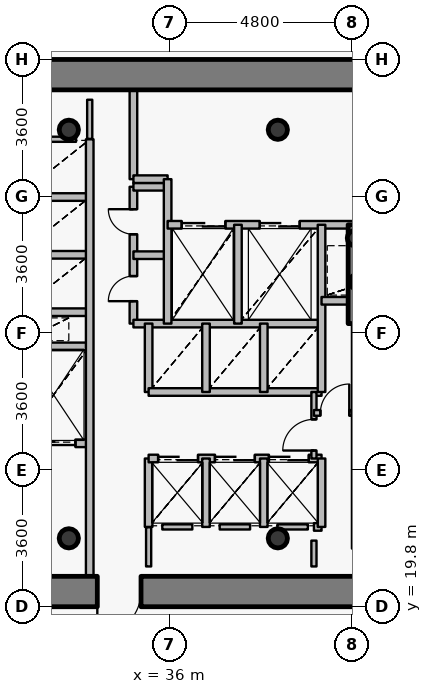
"""IFC4 building model, lengths in metres.
Left out: names, types, materials, properties, quantities, classifications, styles, units other than length and angle.
Written with IfcOpenShell. Run it as: python <this file> out.ifc"""

import sys

from ifc_helpers import new_model, si_unit, direction, frame, frame_2d, origin, origin_2d, place, context, subcontext, project, spatial, rectangle, hollow_circle, extrude, source, transform, mapped, element, fill, save


model = new_model("IFC4")
c1 = context("Model", 3, precision=1e-05, world=origin(), true_north=direction((0.0, 1.0)))
c2 = subcontext(c1, "Body", "Model", "MODEL_VIEW")
j1 = project(units=[si_unit("LENGTHUNIT", "METRE"), si_unit("PLANEANGLEUNIT", "RADIAN")], contexts=[c1])
p1 = place(None, origin())
s1 = spatial("IfcSite", under=j1, at=p1, CompositionType="ELEMENT")
p2 = place(p1, origin())
s2 = spatial("IfcBuilding", under=s1, at=p2, CompositionType="ELEMENT")
p3 = place(p2, frame((0.0, 0.0, 130.95)))
s3 = spatial("IfcBuildingStorey", under=s2, at=p3, CompositionType="ELEMENT", Elevation=130.95)
for number, where, z_axis, x_axis in (
    (1, (33.35, 21.6, 0.0), (0.0, 0.0, 1.0), (1.0, 0.0, 0.0)),
    (2, (38.85, 21.6, 0.0), (0.0, 0.0, 1.0), (1.0, 0.0, 0.0)),
    (3, (38.85, 32.35, 0.0), (0.0, 0.0, 1.0), (1.0, 0.0, 0.0)),
    (4, (33.35, 32.35, 0.0), (0.0, 0.0, 1.0), (1.0, 0.0, 0.0)),
):
    element("IfcColumn", number, at=place(p3, frame(where, z_axis=z_axis, x_axis=x_axis)), inside=s3, PredefinedType="COLUMN", context=c2, shape_type="SweptSolid", body=[
        extrude(hollow_circle(Radius=0.254, WallThickness=0.02, at=origin_2d()), origin(), (0.0, 0.0, 1.0), 3.75),
    ])
for number, where, z_axis, x_axis in (
    (5, (40.95, 28.35, 0.0), (0.0, 0.0, 1.0), (1.0, 0.0, 0.0)),
    (6, (40.88, 29.5, 0.0), (0.0, 0.0, 1.0), (1.0, 0.0, 0.0)),
):
    element("IfcColumn", number, at=place(p3, frame(where, z_axis=z_axis, x_axis=x_axis)), inside=s3, PredefinedType="COLUMN", context=c2, shape_type="SweptSolid", body=[
        extrude(hollow_circle(Radius=0.203, WallThickness=0.016, at=origin_2d()), origin(), (0.0, 0.0, 1.0), 3.75),
    ])
p4 = place(p3, frame((26.6, 33.8, 0.0), z_axis=(0.0, 0.0, 1.0), x_axis=(1.0, 0.0, 0.0)))
e7 = element("IfcWall", 7, at=p4, inside=s3, PredefinedType="SHEAR", context=c2, shape_type="SweptSolid", body=[
    extrude(rectangle(XDim=18.8, YDim=0.8, at=frame_2d((9.4, 0.0))), origin(), (0.0, 0.0, 1.0), 2.95),
])
p5 = place(p3, frame((45.4, 20.2, 0.0), z_axis=(0.0, 0.0, 1.0), x_axis=(-1.0, 0.0, 0.0)))
e8 = element("IfcWall", 8, at=p5, inside=s3, PredefinedType="SHEAR", context=c2, shape_type="SweptSolid", body=[
    extrude(rectangle(XDim=18.8, YDim=0.8, at=frame_2d((9.4, 0.0))), origin(), (0.0, 0.0, 1.0), 2.95),
])
p6 = place(p5, frame((10.15, 0.0, 0.0)))
e9 = element("IfcOpeningElement", 9, at=p6, cuts=e8, PredefinedType="OPENING", context=c2, shape_type="SweptSolid", body=[
    extrude(rectangle(XDim=1.15, YDim=2.15, at=origin_2d()), frame((0.575, 0.41, 1.075), z_axis=(0.0, -1.0, 0.0), x_axis=(1.0, 0.0, 0.0)), (0.0, 0.0, 1.0), 0.82),
])
p7 = place(p3, frame((40.9, 27.25, 0.0), z_axis=(0.0, 0.0, 1.0), x_axis=(0.0, 1.0, 0.0)))
e10 = element("IfcWall", 10, at=p7, inside=s3, PredefinedType="SHEAR", context=c2, shape_type="SweptSolid", body=[
    extrude(rectangle(XDim=2.6, YDim=0.4, at=frame_2d((1.3, 0.0))), origin(), (0.0, 0.0, 1.0), 3.1),
])
p8 = place(p3, frame((32.0, 24.1, 0.0), z_axis=(0.0, 0.0, 1.0), x_axis=(1.0, 0.0, 0.0)))
e11 = element("IfcWall", 11, at=p8, inside=s3, PredefinedType="PARTITIONING", context=c2, shape_type="SweptSolid", body=[
    extrude(rectangle(XDim=1.9, YDim=0.2, at=frame_2d((0.95, 0.0))), origin(), (0.0, 0.0, 1.0), 3.085),
])
p9 = place(p8, frame((0.375, 0.0, 0.0)))
e12 = element("IfcOpeningElement", 12, at=p9, cuts=e11, PredefinedType="OPENING", context=c2, shape_type="SweptSolid", body=[
    extrude(rectangle(XDim=1.15, YDim=2.15, at=origin_2d()), frame((0.575, 0.11, 1.075), z_axis=(0.0, -1.0, 0.0), x_axis=(1.0, 0.0, 0.0)), (0.0, 0.0, 1.0), 0.22),
])
for number, where, z_axis, x_axis in (
    (13, (32.0, 26.65, 0.0), (0.0, 0.0, 1.0), (1.0, 0.0, 0.0)),
    (14, (32.0, 27.55, 0.0), (0.0, 0.0, 1.0), (1.0, 0.0, 0.0)),
    (15, (32.0, 29.06, 0.0), (0.0, 0.0, 1.0), (1.0, 0.0, 0.0)),
    (16, (32.0, 30.58, 0.0), (0.0, 0.0, 1.0), (1.0, 0.0, 0.0)),
):
    element("IfcWall", number, at=place(p3, frame(where, z_axis=z_axis, x_axis=x_axis)), inside=s3, PredefinedType="PARTITIONING", context=c2, shape_type="SweptSolid", body=[
        extrude(rectangle(XDim=1.9, YDim=0.2, at=frame_2d((0.95, 0.0))), origin(), (0.0, 0.0, 1.0), 3.085),
    ])
p10 = place(p3, frame((33.9, 20.6, 0.0), z_axis=(0.0, 0.0, 1.0), x_axis=(0.0, 1.0, 0.0)))
e17 = element("IfcWall", 17, at=p10, inside=s3, PredefinedType="PARTITIONING", context=c2, shape_type="SweptSolid", body=[
    extrude(rectangle(XDim=11.5, YDim=0.2, at=frame_2d((5.75, 0.0))), origin(), (0.0, 0.0, 1.0), 3.085),
])
p11 = place(p3, frame((35.05, 27.25, 0.0), z_axis=(0.0, 0.0, 1.0), x_axis=(0.0, 1.0, 0.0)))
e18 = element("IfcWall", 18, at=p11, inside=s3, PredefinedType="PARTITIONING", context=c2, shape_type="SweptSolid", body=[
    extrude(rectangle(XDim=3.6, YDim=0.2, at=frame_2d((1.8, 0.0))), origin(), (0.0, 0.0, 1.0), 3.5),
])
p12 = place(p11, frame((0.59, 0.0, 0.0)))
e19 = element("IfcOpeningElement", 19, at=p12, cuts=e18, PredefinedType="OPENING", context=c2, shape_type="SweptSolid", body=[
    extrude(rectangle(XDim=0.66, YDim=2.05, at=origin_2d()), frame((0.33, 0.11, 1.025), z_axis=(0.0, -1.0, 0.0), x_axis=(1.0, 0.0, 0.0)), (0.0, 0.0, 1.0), 0.22),
])
p13 = place(p11, frame((2.35, 0.0, 0.0)))
e20 = element("IfcOpeningElement", 20, at=p13, cuts=e18, PredefinedType="OPENING", context=c2, shape_type="SweptSolid", body=[
    extrude(rectangle(XDim=0.66, YDim=2.05, at=origin_2d()), frame((0.33, 0.11, 1.025), z_axis=(0.0, -1.0, 0.0), x_axis=(1.0, 0.0, 0.0)), (0.0, 0.0, 1.0), 0.22),
])
p14 = place(p3, frame((35.05, 27.25, 0.0), z_axis=(0.0, 0.0, 1.0), x_axis=(1.0, 0.0, 0.0)))
e21 = element("IfcWall", 21, at=p14, inside=s3, PredefinedType="PARTITIONING", context=c2, shape_type="SweptSolid", body=[
    extrude(rectangle(XDim=4.95, YDim=0.2, at=frame_2d((2.475, 0.0))), origin(), (0.0, 0.0, 1.0), 3.085),
])
for number, where, z_axis, x_axis in (
    (22, (35.05, 29.05, 0.0), (0.0, 0.0, 1.0), (1.0, 0.0, 0.0)),
    (23, (35.05, 30.85, 0.0), (0.0, 0.0, 1.0), (1.0, 0.0, 0.0)),
):
    element("IfcWall", number, at=place(p3, frame(where, z_axis=z_axis, x_axis=x_axis)), inside=s3, PredefinedType="PARTITIONING", context=c2, shape_type="SweptSolid", body=[
        extrude(rectangle(XDim=0.9, YDim=0.2, at=frame_2d((0.45, 0.0))), origin(), (0.0, 0.0, 1.0), 3.5),
    ])
p15 = place(p3, frame((35.05, 31.05, 0.0), z_axis=(0.0, 0.0, 1.0), x_axis=(0.0, 1.0, 0.0)))
e24 = element("IfcWall", 24, at=p15, inside=s3, PredefinedType="PARTITIONING", context=c2, shape_type="SweptSolid", body=[
    extrude(rectangle(XDim=2.35, YDim=0.2, at=frame_2d((1.175, 0.0))), origin(), (0.0, 0.0, 1.0), 3.085),
])
p16 = place(p3, frame((35.05, 31.05, 0.0), z_axis=(0.0, 0.0, 1.0), x_axis=(1.0, 0.0, 0.0)))
e25 = element("IfcWall", 25, at=p16, inside=s3, PredefinedType="PARTITIONING", context=c2, shape_type="SweptSolid", body=[
    extrude(rectangle(XDim=0.9, YDim=0.2, at=frame_2d((0.45, 0.0))), origin(), (0.0, 0.0, 1.0), 3.5),
])
p17 = place(p3, frame((35.45, 21.9, 0.0), z_axis=(0.0, 0.0, 1.0), x_axis=(0.0, 1.0, 0.0)))
e26 = element("IfcWall", 26, at=p17, inside=s3, PredefinedType="PARTITIONING", context=c2, shape_type="SweptSolid", body=[
    extrude(rectangle(XDim=1.8, YDim=0.2, at=frame_2d((0.9, 0.0))), origin(), (0.0, 0.0, 1.0), 3.5),
])
p18 = place(p3, frame((35.45, 23.7, 0.0), z_axis=(0.0, 0.0, 1.0), x_axis=(1.0, 0.0, 0.0)))
e27 = element("IfcWall", 27, at=p18, inside=s3, PredefinedType="PARTITIONING", context=c2, shape_type="SweptSolid", body=[
    extrude(rectangle(XDim=4.55, YDim=0.2, at=frame_2d((2.275, 0.0))), origin(), (0.0, 0.0, 1.0), 3.085),
])
p19 = place(p18, frame((0.25, 0.0, 0.0)))
e28 = element("IfcOpeningElement", 28, at=p19, cuts=e27, PredefinedType="OPENING", context=c2, shape_type="SweptSolid", body=[
    extrude(rectangle(XDim=1.05, YDim=2.15, at=origin_2d()), frame((0.525, 0.11, 1.075), z_axis=(0.0, -1.0, 0.0), x_axis=(1.0, 0.0, 0.0)), (0.0, 0.0, 1.0), 0.22),
])
p20 = place(p18, frame((1.745, 0.0, 0.0)))
e29 = element("IfcOpeningElement", 29, at=p20, cuts=e27, PredefinedType="OPENING", context=c2, shape_type="SweptSolid", body=[
    extrude(rectangle(XDim=1.05, YDim=2.15, at=origin_2d()), frame((0.525, 0.11, 1.075), z_axis=(0.0, -1.0, 0.0), x_axis=(1.0, 0.0, 0.0)), (0.0, 0.0, 1.0), 0.22),
])
p21 = place(p18, frame((3.165, 0.0, 0.0)))
e30 = element("IfcOpeningElement", 30, at=p21, cuts=e27, PredefinedType="OPENING", context=c2, shape_type="SweptSolid", body=[
    extrude(rectangle(XDim=1.05, YDim=2.15, at=origin_2d()), frame((0.525, 0.11, 1.075), z_axis=(0.0, -1.0, 0.0), x_axis=(1.0, 0.0, 0.0)), (0.0, 0.0, 1.0), 0.22),
])
p22 = place(p3, frame((35.45, 25.45, 0.0), z_axis=(0.0, 0.0, 1.0), x_axis=(0.0, 1.0, 0.0)))
e31 = element("IfcWall", 31, at=p22, inside=s3, PredefinedType="PARTITIONING", context=c2, shape_type="SweptSolid", body=[
    extrude(rectangle(XDim=1.8, YDim=0.2, at=frame_2d((0.9, 0.0))), origin(), (0.0, 0.0, 1.0), 3.5),
])
p23 = place(p3, frame((35.45, 25.45, 0.0), z_axis=(0.0, 0.0, 1.0), x_axis=(1.0, 0.0, 0.0)))
e32 = element("IfcWall", 32, at=p23, inside=s3, PredefinedType="PARTITIONING", context=c2, shape_type="SweptSolid", body=[
    extrude(rectangle(XDim=4.55, YDim=0.2, at=frame_2d((2.275, 0.0))), origin(), (0.0, 0.0, 1.0), 3.085),
])
p24 = place(p3, frame((35.95, 27.25, 0.0), z_axis=(0.0, 0.0, 1.0), x_axis=(0.0, 1.0, 0.0)))
e33 = element("IfcWall", 33, at=p24, inside=s3, PredefinedType="PARTITIONING", context=c2, shape_type="SweptSolid", body=[
    extrude(rectangle(XDim=3.8, YDim=0.2, at=frame_2d((1.9, 0.0))), origin(), (0.0, 0.0, 1.0), 3.5),
])
p25 = place(p3, frame((35.95, 29.85, 0.0), z_axis=(0.0, 0.0, 1.0), x_axis=(1.0, 0.0, 0.0)))
e34 = element("IfcWall", 34, at=p25, inside=s3, PredefinedType="PARTITIONING", context=c2, shape_type="SweptSolid", body=[
    extrude(rectangle(XDim=8.49, YDim=0.2, at=frame_2d((4.245, 0.0))), origin(), (0.0, 0.0, 1.0), 3.085),
])
p26 = place(p25, frame((6.1, 0.0, 0.0)))
e35 = element("IfcOpeningElement", 35, at=p26, cuts=e34, PredefinedType="OPENING", context=c2, shape_type="SweptSolid", body=[
    extrude(rectangle(XDim=1.2, YDim=2.15, at=origin_2d()), frame((0.6, 0.11, 1.075), z_axis=(0.0, -1.0, 0.0), x_axis=(1.0, 0.0, 0.0)), (0.0, 0.0, 1.0), 0.22),
])
p27 = place(p25, frame((0.37, 0.0, 0.0)))
e36 = element("IfcOpeningElement", 36, at=p27, cuts=e34, PredefinedType="OPENING", context=c2, shape_type="SweptSolid", body=[
    extrude(rectangle(XDim=1.15, YDim=2.15, at=origin_2d()), frame((0.575, 0.11, 1.075), z_axis=(0.0, -1.0, 0.0), x_axis=(1.0, 0.0, 0.0)), (0.0, 0.0, 1.0), 0.22),
])
p28 = place(p25, frame((2.425, 0.0, 0.0)))
e37 = element("IfcOpeningElement", 37, at=p28, cuts=e34, PredefinedType="OPENING", context=c2, shape_type="SweptSolid", body=[
    extrude(rectangle(XDim=1.05, YDim=2.15, at=origin_2d()), frame((0.525, 0.11, 1.075), z_axis=(0.0, -1.0, 0.0), x_axis=(1.0, 0.0, 0.0)), (0.0, 0.0, 1.0), 0.22),
])
for number, where, z_axis, x_axis in (
    (38, (36.96, 21.9, 0.0), (0.0, 0.0, 1.0), (0.0, 1.0, 0.0)),
    (39, (36.96, 25.45, 0.0), (0.0, 0.0, 1.0), (0.0, 1.0, 0.0)),
):
    element("IfcWall", number, at=place(p3, frame(where, z_axis=z_axis, x_axis=x_axis)), inside=s3, PredefinedType="PARTITIONING", context=c2, shape_type="SweptSolid", body=[
        extrude(rectangle(XDim=1.8, YDim=0.2, at=frame_2d((0.9, 0.0))), origin(), (0.0, 0.0, 1.0), 3.5),
    ])
p29 = place(p3, frame((37.8, 27.25, 0.0), z_axis=(0.0, 0.0, 1.0), x_axis=(0.0, 1.0, 0.0)))
e40 = element("IfcWall", 40, at=p29, inside=s3, PredefinedType="PARTITIONING", context=c2, shape_type="SweptSolid", body=[
    extrude(rectangle(XDim=2.6, YDim=0.2, at=frame_2d((1.3, 0.0))), origin(), (0.0, 0.0, 1.0), 3.5),
])
for number, where, z_axis, x_axis in (
    (41, (38.48, 21.9, 0.0), (0.0, 0.0, 1.0), (0.0, 1.0, 0.0)),
    (42, (38.48, 25.45, 0.0), (0.0, 0.0, 1.0), (0.0, 1.0, 0.0)),
):
    element("IfcWall", number, at=place(p3, frame(where, z_axis=z_axis, x_axis=x_axis)), inside=s3, PredefinedType="PARTITIONING", context=c2, shape_type="SweptSolid", body=[
        extrude(rectangle(XDim=1.8, YDim=0.2, at=frame_2d((0.9, 0.0))), origin(), (0.0, 0.0, 1.0), 3.5),
    ])
p30 = place(p3, frame((39.8, 21.9, 0.0), z_axis=(0.0, 0.0, 1.0), x_axis=(1.0, 0.0, 0.0)))
e43 = element("IfcWall", 43, at=p30, inside=s3, PredefinedType="PARTITIONING", context=c2, shape_type="SweptSolid", body=[
    extrude(rectangle(XDim=0.2, YDim=0.2, at=frame_2d((0.1, 0.0))), origin(), (0.0, 0.0, 1.0), 3.5),
])
p31 = place(p3, frame((39.8, 23.7, 0.0), z_axis=(0.0, 0.0, 1.0), x_axis=(0.0, 1.0, 0.0)))
e44 = element("IfcWall", 44, at=p31, inside=s3, PredefinedType="PARTITIONING", context=c2, shape_type="SweptSolid", body=[
    extrude(rectangle(XDim=1.75, YDim=0.135, at=frame_2d((0.875, 0.0))), origin(), (0.0, 0.0, 1.0), 3.5),
])
p32 = place(p31, frame((0.21, 0.0, 0.0)))
e45 = element("IfcOpeningElement", 45, at=p32, cuts=e44, PredefinedType="OPENING", context=c2, shape_type="SweptSolid", body=[
    extrude(rectangle(XDim=0.82, YDim=2.1, at=origin_2d()), frame((0.41, 0.078, 1.05), z_axis=(0.0, -1.0, 0.0), x_axis=(1.0, 0.0, 0.0)), (0.0, 0.0, 1.0), 0.155),
])
p33 = place(p3, frame((39.8, 24.9, 0.0), z_axis=(0.0, 0.0, 1.0), x_axis=(1.0, 0.0, 0.0)))
e46 = element("IfcWall", 46, at=p33, inside=s3, PredefinedType="PARTITIONING", context=c2, shape_type="SweptSolid", body=[
    extrude(rectangle(XDim=1.1, YDim=0.15, at=frame_2d((0.55, 0.0))), origin(), (0.0, 0.0, 1.0), 3.5),
])
p34 = place(p33, frame((0.17, 0.0, 0.0)))
e47 = element("IfcOpeningElement", 47, at=p34, cuts=e46, PredefinedType="OPENING", context=c2, shape_type="SweptSolid", body=[
    extrude(rectangle(XDim=0.76, YDim=2.1, at=origin_2d()), frame((0.38, 0.085, 1.05), z_axis=(0.0, -1.0, 0.0), x_axis=(1.0, 0.0, 0.0)), (0.0, 0.0, 1.0), 0.17),
])
p35 = place(p3, frame((40.0, 21.9, 0.0), z_axis=(0.0, 0.0, 1.0), x_axis=(0.0, 1.0, 0.0)))
e48 = element("IfcWall", 48, at=p35, inside=s3, PredefinedType="PARTITIONING", context=c2, shape_type="SweptSolid", body=[
    extrude(rectangle(XDim=1.8, YDim=0.2, at=frame_2d((0.9, 0.0))), origin(), (0.0, 0.0, 1.0), 3.5),
])
p36 = place(p3, frame((40.0, 25.45, 0.0), z_axis=(0.0, 0.0, 1.0), x_axis=(0.0, 1.0, 0.0)))
e49 = element("IfcWall", 49, at=p36, inside=s3, PredefinedType="PARTITIONING", context=c2, shape_type="SweptSolid", body=[
    extrude(rectangle(XDim=4.4, YDim=0.2, at=frame_2d((2.2, 0.0))), origin(), (0.0, 0.0, 1.0), 3.5),
])
p37 = place(p3, frame((40.0, 27.85, 0.0), z_axis=(0.0, 0.0, 1.0), x_axis=(1.0, 0.0, 0.0)))
e50 = element("IfcWall", 50, at=p37, inside=s3, PredefinedType="PARTITIONING", context=c2, shape_type="SweptSolid", body=[
    extrude(rectangle(XDim=0.9, YDim=0.2, at=frame_2d((0.45, 0.0))), origin(), (0.0, 0.0, 1.0), 3.5),
])
p38 = place(p3, frame((40.9, 21.33, 0.0), z_axis=(0.0, 0.0, 1.0), x_axis=(0.0, 1.0, 0.0)))
e51 = element("IfcWall", 51, at=p38, inside=s3, PredefinedType="PARTITIONING", context=c2, shape_type="SweptSolid", body=[
    extrude(rectangle(XDim=5.91, YDim=0.2, at=frame_2d((2.955, 0.0))), origin(), (0.0, 0.0, 1.0), 3.035),
])
p39 = place(p3, frame((36.6, 21.9, 0.0), z_axis=(0.0, 0.0, 1.0), x_axis=(-1.0, 0.0, 0.0)))
e52 = element("IfcWall", 52, at=p39, inside=s3, PredefinedType="PARTITIONING", context=c2, shape_type="SweptSolid", body=[
    extrude(rectangle(XDim=0.79, YDim=0.135, at=frame_2d((0.395, 0.0))), origin(), (0.0, 0.0, 1.0), 3.5),
])
p40 = place(p3, frame((38.12, 21.9, 0.0), z_axis=(0.0, 0.0, 1.0), x_axis=(-1.0, 0.0, 0.0)))
e53 = element("IfcWall", 53, at=p40, inside=s3, PredefinedType="PARTITIONING", context=c2, shape_type="SweptSolid", body=[
    extrude(rectangle(XDim=0.8, YDim=0.135, at=frame_2d((0.4, 0.0))), origin(), (0.0, 0.0, 1.0), 3.5),
])
p41 = place(p3, frame((39.64, 21.9, 0.0), z_axis=(0.0, 0.0, 1.0), x_axis=(-1.0, 0.0, 0.0)))
e54 = element("IfcWall", 54, at=p41, inside=s3, PredefinedType="PARTITIONING", context=c2, shape_type="SweptSolid", body=[
    extrude(rectangle(XDim=0.8, YDim=0.135, at=frame_2d((0.4, 0.0))), origin(), (0.0, 0.0, 1.0), 3.085),
])
p42 = place(p3, frame((32.36, 32.1, 0.0), z_axis=(0.0, 0.0, 1.0), x_axis=(1.0, 0.0, 0.0)))
e55 = element("IfcWall", 55, at=p42, inside=s3, PredefinedType="PARTITIONING", context=c2, shape_type="SweptSolid", body=[
    extrude(rectangle(XDim=1.18, YDim=0.135, at=frame_2d((0.59, 0.0))), origin(), (0.0, 0.0, 1.0), 3.085),
])
p43 = place(p3, frame((39.8, 20.86, 0.0), z_axis=(0.0, 0.0, 1.0), x_axis=(0.0, 1.0, 0.0)))
e56 = element("IfcWall", 56, at=p43, inside=s3, PredefinedType="PARTITIONING", context=c2, shape_type="SweptSolid", body=[
    extrude(rectangle(XDim=0.68, YDim=0.135, at=frame_2d((0.34, 0.0))), origin(), (0.0, 0.0, 1.0), 3.035),
])
for number, where, z_axis, x_axis in (
    (57, (35.45, 21.89, 0.0), (0.0, 0.0, 1.0), (0.0, -1.0, 0.0)),
    (58, (33.9, 32.11, 0.0), (0.0, 0.0, 1.0), (0.0, 1.0, 0.0)),
):
    element("IfcWall", number, at=place(p3, frame(where, z_axis=z_axis, x_axis=x_axis)), inside=s3, PredefinedType="PARTITIONING", context=c2, shape_type="SweptSolid", body=[
        extrude(rectangle(XDim=1.03, YDim=0.135, at=frame_2d((0.515, 0.0))), origin(), (0.0, 0.0, 1.0), 3.085),
    ])
m1 = source(origin(), c2, "Body", "SweptSolid", [
    extrude(rectangle(XDim=1.15, YDim=2.15, at=origin_2d()), frame((0.575, 0.025, 1.075), z_axis=(0.0, -1.0, 0.0), x_axis=(1.0, 0.0, 0.0)), (0.0, 0.0, 1.0), 0.05),
])
p44 = place(p6, origin())
e59 = element("IfcDoor", 59, at=p44, inside=s3, OperationType="SINGLE_SWING_RIGHT", PredefinedType="DOOR", context=c2, shape_type="MappedRepresentation", body=[
    mapped(m1, transform((0.0, 0.0, 0.0), x_axis=(1.0, 0.0, 0.0), y_axis=(0.0, 1.0, 0.0), z_axis=(0.0, 0.0, 1.0), scale=1.0)),
])
fill(e9, e59)
m2 = source(origin(), c2, "Body", "SweptSolid", [
    extrude(rectangle(XDim=1.15, YDim=2.15, at=origin_2d()), frame((0.575, 0.025, 1.075), z_axis=(0.0, -1.0, 0.0), x_axis=(1.0, 0.0, 0.0)), (0.0, 0.0, 1.0), 0.05),
])
p45 = place(p27, origin())
e60 = element("IfcDoor", 60, at=p45, inside=s3, OperationType="DOUBLE_DOOR_SLIDING", PredefinedType="USERDEFINED", context=c2, shape_type="MappedRepresentation", body=[
    mapped(m2, transform((0.0, 0.0, 0.0), x_axis=(1.0, 0.0, 0.0), y_axis=(0.0, 1.0, 0.0), z_axis=(0.0, 0.0, 1.0), scale=1.0)),
])
fill(e36, e60)
p46 = place(p9, origin())
e61 = element("IfcDoor", 61, at=p46, inside=s3, OperationType="DOUBLE_DOOR_SLIDING", PredefinedType="USERDEFINED", context=c2, shape_type="MappedRepresentation", body=[
    mapped(m2, transform((0.0, 0.0, 0.0), x_axis=(1.0, 0.0, 0.0), y_axis=(0.0, 1.0, 0.0), z_axis=(0.0, 0.0, 1.0), scale=1.0)),
])
fill(e12, e61)
m3 = source(origin(), c2, "Body", "SweptSolid", [
    extrude(rectangle(XDim=1.05, YDim=2.15, at=origin_2d()), frame((0.525, 0.025, 1.075), z_axis=(0.0, -1.0, 0.0), x_axis=(1.0, 0.0, 0.0)), (0.0, 0.0, 1.0), 0.05),
])
p47 = place(p28, origin())
e62 = element("IfcDoor", 62, at=p47, inside=s3, OperationType="DOUBLE_DOOR_SLIDING", PredefinedType="USERDEFINED", context=c2, shape_type="MappedRepresentation", body=[
    mapped(m3, transform((0.0, 0.0, 0.0), x_axis=(1.0, 0.0, 0.0), y_axis=(0.0, 1.0, 0.0), z_axis=(0.0, 0.0, 1.0), scale=1.0)),
])
fill(e37, e62)
p48 = place(p19, origin())
e63 = element("IfcDoor", 63, at=p48, inside=s3, OperationType="DOUBLE_DOOR_SLIDING", PredefinedType="USERDEFINED", context=c2, shape_type="MappedRepresentation", body=[
    mapped(m3, transform((0.0, 0.0, 0.0), x_axis=(1.0, 0.0, 0.0), y_axis=(0.0, 1.0, 0.0), z_axis=(0.0, 0.0, 1.0), scale=1.0)),
])
fill(e28, e63)
p49 = place(p20, origin())
e64 = element("IfcDoor", 64, at=p49, inside=s3, OperationType="DOUBLE_DOOR_SLIDING", PredefinedType="USERDEFINED", context=c2, shape_type="MappedRepresentation", body=[
    mapped(m3, transform((0.0, 0.0, 0.0), x_axis=(1.0, 0.0, 0.0), y_axis=(0.0, 1.0, 0.0), z_axis=(0.0, 0.0, 1.0), scale=1.0)),
])
fill(e29, e64)
p50 = place(p21, origin())
e65 = element("IfcDoor", 65, at=p50, inside=s3, OperationType="DOUBLE_DOOR_SLIDING", PredefinedType="USERDEFINED", context=c2, shape_type="MappedRepresentation", body=[
    mapped(m3, transform((0.0, 0.0, 0.0), x_axis=(1.0, 0.0, 0.0), y_axis=(0.0, 1.0, 0.0), z_axis=(0.0, 0.0, 1.0), scale=1.0)),
])
fill(e30, e65)
m4 = source(origin(), c2, "Body", "SweptSolid", [
    extrude(rectangle(XDim=0.66, YDim=2.05, at=origin_2d()), frame((0.33, 0.025, 1.025), z_axis=(0.0, -1.0, 0.0), x_axis=(1.0, 0.0, 0.0)), (0.0, 0.0, 1.0), 0.05),
])
p51 = place(p12, origin())
e66 = element("IfcDoor", 66, at=p51, inside=s3, OperationType="SINGLE_SWING_LEFT", PredefinedType="USERDEFINED", context=c2, shape_type="MappedRepresentation", body=[
    mapped(m4, transform((0.0, 0.0, 0.0), x_axis=(1.0, 0.0, 0.0), y_axis=(0.0, 1.0, 0.0), z_axis=(0.0, 0.0, 1.0), scale=1.0)),
])
fill(e19, e66)
p52 = place(p13, origin())
e67 = element("IfcDoor", 67, at=p52, inside=s3, OperationType="SINGLE_SWING_RIGHT", PredefinedType="USERDEFINED", context=c2, shape_type="MappedRepresentation", body=[
    mapped(m4, transform((0.0, 0.0, 0.0), x_axis=(1.0, 0.0, 0.0), y_axis=(0.0, 1.0, 0.0), z_axis=(0.0, 0.0, 1.0), scale=1.0)),
])
fill(e20, e67)
m5 = source(origin(), c2, "Body", "SweptSolid", [
    extrude(rectangle(XDim=0.82, YDim=2.1, at=origin_2d()), frame((0.41, 0.025, 1.05), z_axis=(0.0, -1.0, 0.0), x_axis=(1.0, 0.0, 0.0)), (0.0, 0.0, 1.0), 0.05),
])
p53 = place(p32, origin())
e68 = element("IfcDoor", 68, at=p53, inside=s3, OperationType="SINGLE_SWING_LEFT", PredefinedType="DOOR", context=c2, shape_type="MappedRepresentation", body=[
    mapped(m5, transform((0.0, 0.0, 0.0), x_axis=(1.0, 0.0, 0.0), y_axis=(0.0, 1.0, 0.0), z_axis=(0.0, 0.0, 1.0), scale=1.0)),
])
fill(e45, e68)
m6 = source(origin(), c2, "Body", "SweptSolid", [
    extrude(rectangle(XDim=0.76, YDim=2.1, at=origin_2d()), frame((0.38, 0.025, 1.05), z_axis=(0.0, -1.0, 0.0), x_axis=(1.0, 0.0, 0.0)), (0.0, 0.0, 1.0), 0.05),
])
p54 = place(p34, origin())
e69 = element("IfcDoor", 69, at=p54, inside=s3, OperationType="SINGLE_SWING_RIGHT", PredefinedType="DOOR", context=c2, shape_type="MappedRepresentation", body=[
    mapped(m6, transform((0.0, 0.0, 0.0), x_axis=(1.0, 0.0, 0.0), y_axis=(0.0, 1.0, 0.0), z_axis=(0.0, 0.0, 1.0), scale=1.0)),
])
fill(e47, e69)
save(model, sys.argv[1])
